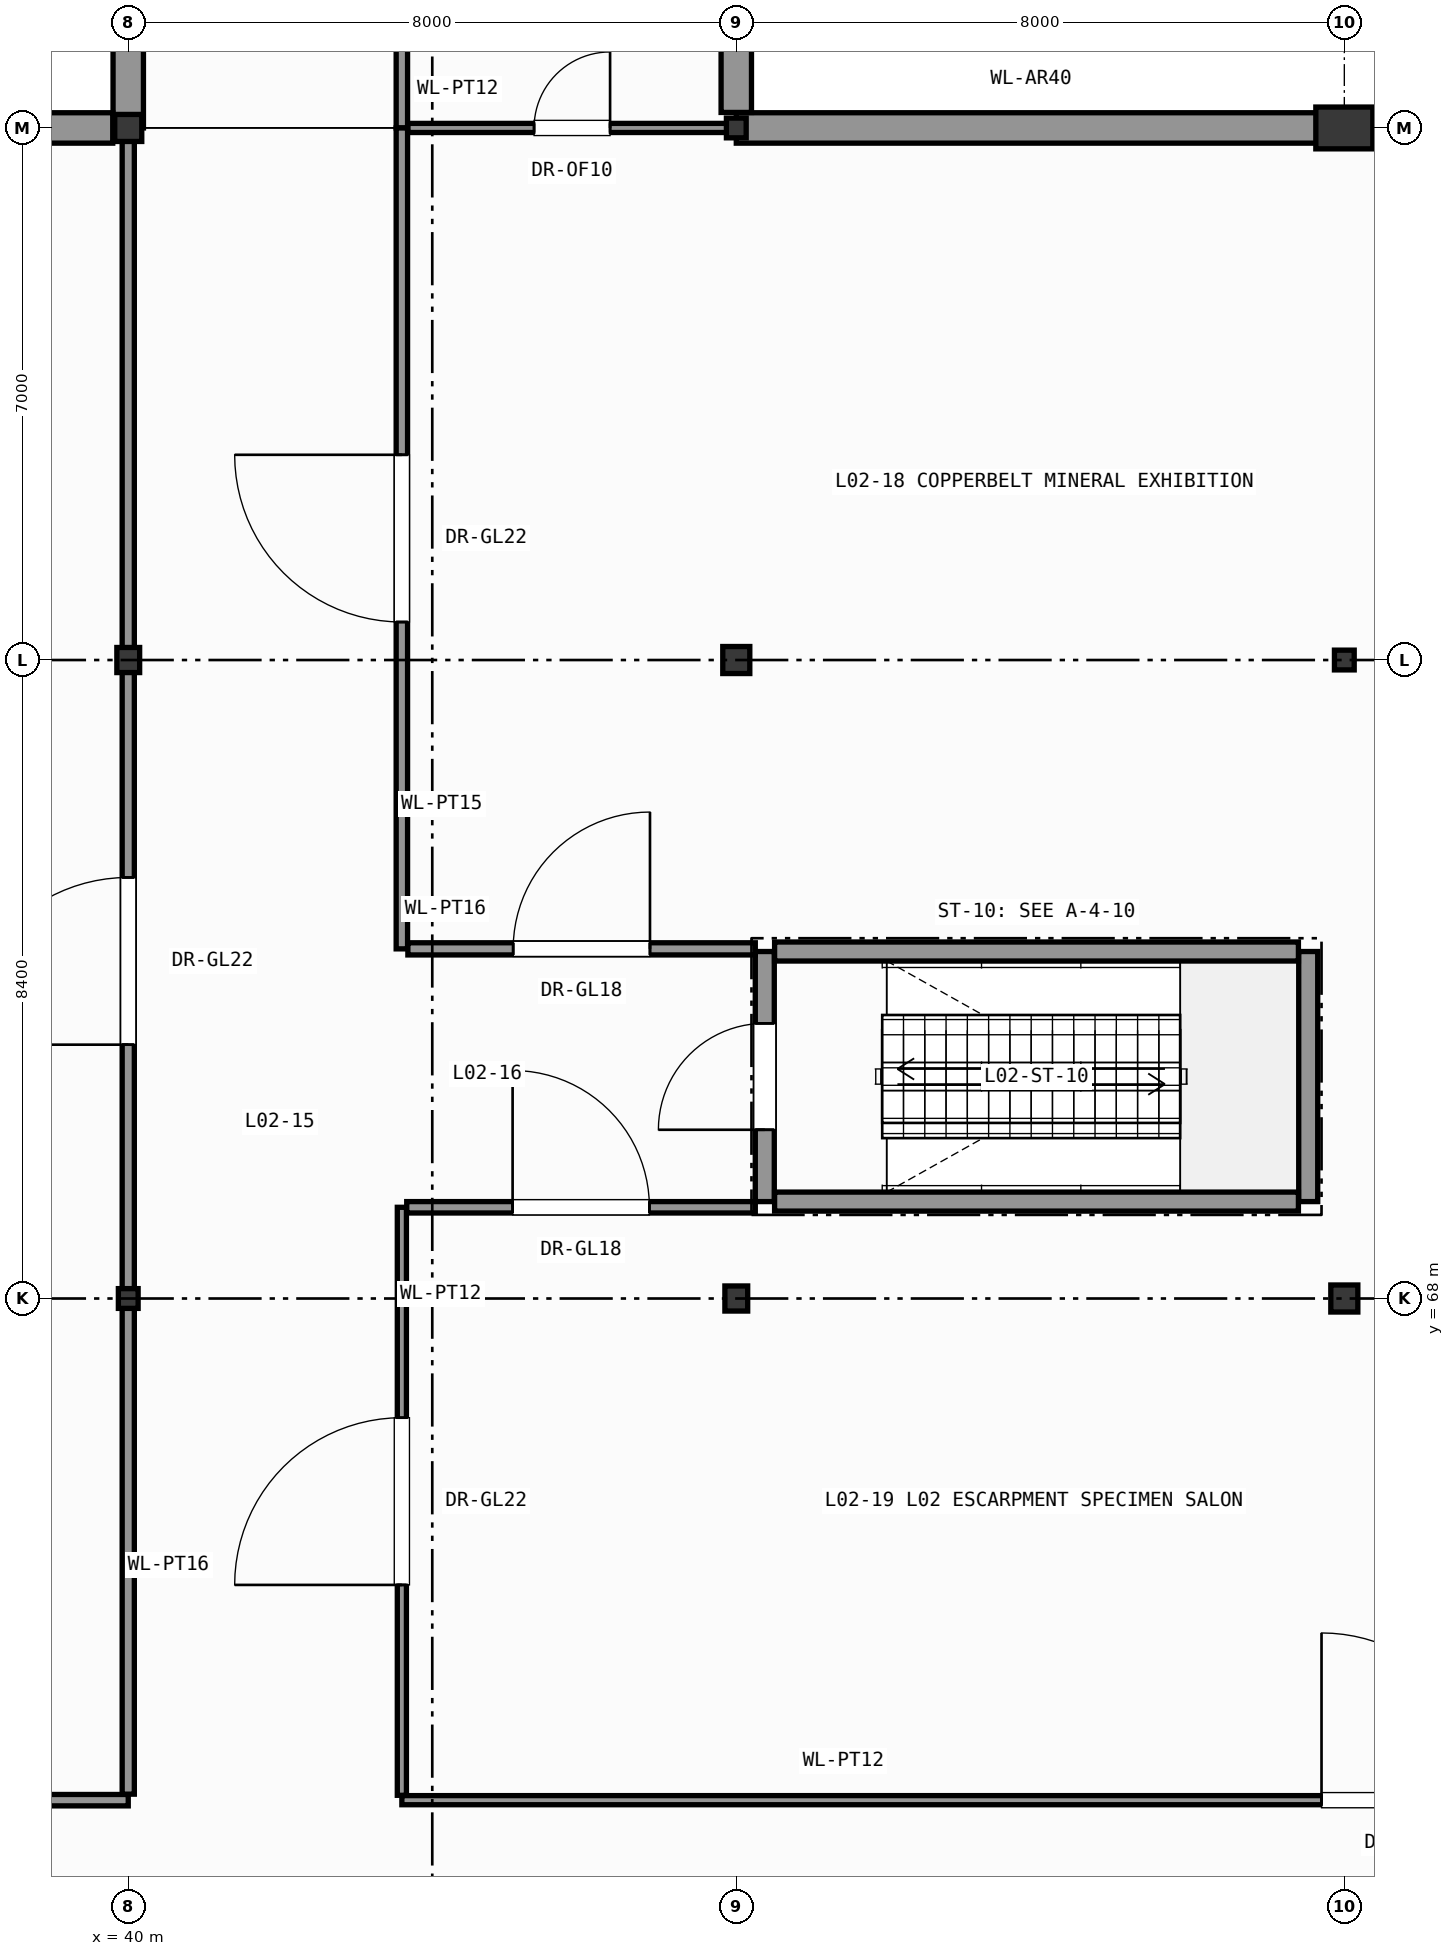
"""IFC4 building model, lengths in metres.
Left out: names, types, materials, properties, quantities, classifications, styles, units other than length and angle.
Written with IfcOpenShell. Run it as: python <this file> out.ifc"""

import sys

from ifc_helpers import new_model, si_unit, direction, frame, frame_2d, origin, origin_2d, place, context, subcontext, project, spatial, rectangle, hollow_rectangle, hollow_circle, i_section, extrude, element, fill, save


model = new_model("IFC4")
c1 = context("Model", 3, precision=1e-05, world=origin(), true_north=direction((0.0, 1.0)))
c2 = subcontext(c1, "Body", "Model", "MODEL_VIEW")
j1 = project(units=[si_unit("LENGTHUNIT", "METRE"), si_unit("PLANEANGLEUNIT", "RADIAN")], contexts=[c1])
p1 = place(None, origin())
s1 = spatial("IfcSite", under=j1, at=p1, CompositionType="ELEMENT")
p2 = place(p1, origin())
s2 = spatial("IfcBuilding", under=s1, at=p2, CompositionType="ELEMENT")
p3 = place(p2, frame((0.0, 0.0, 7.8)))
s3 = spatial("IfcBuildingStorey", under=s2, at=p3, CompositionType="ELEMENT", Elevation=7.8)
p4 = place(p3, frame((40.0, 68.0, 0.0), z_axis=(0.0, 0.0, 1.0), x_axis=(1.0, 0.0, 0.0)))
e1 = element("IfcColumn", 1, at=p4, inside=s3, PredefinedType="COLUMN", context=c2, shape_type="SweptSolid", body=[
    extrude(hollow_rectangle(XDim=0.26, YDim=0.26, WallThickness=0.012, InnerFilletRadius=0.012, OuterFilletRadius=0.025, at=origin_2d()), origin(), (0.0, 0.0, 1.0), 5.4),
])
p5 = place(p3, frame((40.0, 76.4, 0.0), z_axis=(0.0, 0.0, 1.0), x_axis=(1.0, 0.0, 0.0)))
e2 = element("IfcColumn", 2, at=p5, inside=s3, PredefinedType="COLUMN", context=c2, shape_type="SweptSolid", body=[
    extrude(i_section(OverallWidth=0.3, OverallDepth=0.33, WebThickness=0.01, FlangeThickness=0.017, FilletRadius=0.027, at=origin_2d()), origin(), (0.0, 0.0, 1.0), 5.4),
])
p6 = place(p3, frame((40.0, 83.4, 0.0), z_axis=(0.0, 0.0, 1.0), x_axis=(1.0, 0.0, 0.0)))
e3 = element("IfcColumn", 3, at=p6, inside=s3, PredefinedType="COLUMN", context=c2, shape_type="SweptSolid", body=[
    extrude(hollow_circle(Radius=0.178, WallThickness=0.016, at=origin_2d()), origin(), (0.0, 0.0, 1.0), 5.4),
])
p7 = place(p3, frame((48.0, 68.0, 0.0), z_axis=(0.0, 0.0, 1.0), x_axis=(1.0, 0.0, 0.0)))
e4 = element("IfcColumn", 4, at=p7, inside=s3, PredefinedType="COLUMN", context=c2, shape_type="SweptSolid", body=[
    extrude(i_section(OverallWidth=0.3, OverallDepth=0.33, WebThickness=0.01, FlangeThickness=0.017, FilletRadius=0.027, at=origin_2d()), origin(), (0.0, 0.0, 1.0), 5.4),
])
p8 = place(p3, frame((48.0, 76.4, 0.0), z_axis=(0.0, 0.0, 1.0), x_axis=(1.0, 0.0, 0.0)))
e5 = element("IfcColumn", 5, at=p8, inside=s3, PredefinedType="COLUMN", context=c2, shape_type="SweptSolid", body=[
    extrude(hollow_circle(Radius=0.178, WallThickness=0.016, at=origin_2d()), origin(), (0.0, 0.0, 1.0), 5.4),
])
p9 = place(p3, frame((48.0, 83.4, 0.0), z_axis=(0.0, 0.0, 1.0), x_axis=(1.0, 0.0, 0.0)))
e6 = element("IfcColumn", 6, at=p9, inside=s3, PredefinedType="COLUMN", context=c2, shape_type="SweptSolid", body=[
    extrude(hollow_rectangle(XDim=0.26, YDim=0.26, WallThickness=0.012, InnerFilletRadius=0.012, OuterFilletRadius=0.025, at=origin_2d()), origin(), (0.0, 0.0, 1.0), 5.4),
])
p10 = place(p3, frame((56.0, 68.0, 0.0), z_axis=(0.0, 0.0, 1.0), x_axis=(1.0, 0.0, 0.0)))
e7 = element("IfcColumn", 7, at=p10, inside=s3, PredefinedType="COLUMN", context=c2, shape_type="SweptSolid", body=[
    extrude(hollow_circle(Radius=0.178, WallThickness=0.016, at=origin_2d()), origin(), (0.0, 0.0, 1.0), 5.4),
])
p11 = place(p3, frame((56.0, 76.4, 0.0), z_axis=(0.0, 0.0, 1.0), x_axis=(1.0, 0.0, 0.0)))
e8 = element("IfcColumn", 8, at=p11, inside=s3, PredefinedType="COLUMN", context=c2, shape_type="SweptSolid", body=[
    extrude(hollow_rectangle(XDim=0.26, YDim=0.26, WallThickness=0.012, InnerFilletRadius=0.012, OuterFilletRadius=0.025, at=origin_2d()), origin(), (0.0, 0.0, 1.0), 5.4),
])
p12 = place(p3, frame((56.0, 83.4, 0.0), z_axis=(0.0, 0.0, 1.0), x_axis=(1.0, 0.0, 0.0)))
e9 = element("IfcColumn", 9, at=p12, inside=s3, PredefinedType="PILASTER", context=c2, shape_type="SweptSolid", body=[
    extrude(rectangle(XDim=0.75, YDim=0.55, at=origin_2d()), origin(), (0.0, 0.0, 1.0), 5.4),
])
p13 = place(p3, frame((56.0, 83.4, 0.0), z_axis=(0.0, 0.0, 1.0), x_axis=(1.0, 0.0, 0.0)))
e10 = element("IfcWall", 10, at=p13, inside=s3, PredefinedType="SOLIDWALL", context=c2, shape_type="SweptSolid", body=[
    extrude(rectangle(XDim=13.821, YDim=0.4, at=frame_2d((6.911, 0.0))), origin(), (0.0, 0.0, 1.0), 5.15),
])
p14 = place(p3, frame((48.0, 83.4, 0.0), z_axis=(0.0, 0.0, 1.0), x_axis=(1.0, 0.0, 0.0)))
e11 = element("IfcWall", 11, at=p14, inside=s3, PredefinedType="SOLIDWALL", context=c2, shape_type="SweptSolid", body=[
    extrude(rectangle(XDim=8.0, YDim=0.4, at=frame_2d((4.0, 0.0))), origin(), (0.0, 0.0, 1.0), 5.15),
])
p15 = place(p3, frame((48.0, 90.4, 0.0), z_axis=(0.0, 0.0, 1.0), x_axis=(0.0, -1.0, 0.0)))
e12 = element("IfcWall", 12, at=p15, inside=s3, PredefinedType="SOLIDWALL", context=c2, shape_type="SweptSolid", body=[
    extrude(rectangle(XDim=6.796, YDim=0.4, at=frame_2d((3.398, 0.0))), origin(), (0.0, 0.0, 1.0), 5.15),
])
p16 = place(p3, frame((40.0, 83.4, 0.0), z_axis=(0.0, 0.0, 1.0), x_axis=(0.0, 1.0, 0.0)))
e13 = element("IfcWall", 13, at=p16, inside=s3, PredefinedType="SOLIDWALL", context=c2, shape_type="SweptSolid", body=[
    extrude(rectangle(XDim=7.0, YDim=0.4, at=frame_2d((3.5, 0.0))), origin(), (0.0, 0.0, 1.0), 5.15),
])
p17 = place(p3, frame((32.0, 83.4, 0.0), z_axis=(0.0, 0.0, 1.0), x_axis=(1.0, 0.0, 0.0)))
e14 = element("IfcWall", 14, at=p17, inside=s3, PredefinedType="SOLIDWALL", context=c2, shape_type="SweptSolid", body=[
    extrude(rectangle(XDim=7.796, YDim=0.4, at=frame_2d((3.898, 0.0))), origin(), (0.0, 0.0, 1.0), 5.15),
])
p18 = place(p3, frame((48.375, 69.275, 0.0), z_axis=(0.0, 0.0, 1.0), x_axis=(0.0, 1.0, 0.0)))
e15 = element("IfcWall", 15, at=p18, inside=s3, PredefinedType="SHEAR", context=c2, shape_type="SweptSolid", body=[
    extrude(rectangle(XDim=3.29, YDim=0.25, at=frame_2d((1.645, 0.0))), origin(), (0.0, 0.0, 1.0), 5.15),
])
p19 = place(p18, frame((0.945, 0.0, 0.0)))
e16 = element("IfcOpeningElement", 16, at=p19, cuts=e15, PredefinedType="OPENING", context=c2, shape_type="SweptSolid", body=[
    extrude(rectangle(XDim=1.4, YDim=2.2, at=frame_2d((0.7, 1.1))), frame((0.0, 0.135, 0.0), z_axis=(0.0, -1.0, 0.0), x_axis=(1.0, 0.0, 0.0)), (0.0, 0.0, 1.0), 0.27),
])
p20 = place(p3, frame((55.525, 69.275, 0.0), z_axis=(0.0, 0.0, 1.0), x_axis=(0.0, 1.0, 0.0)))
e17 = element("IfcWall", 17, at=p20, inside=s3, PredefinedType="SHEAR", context=c2, shape_type="SweptSolid", body=[
    extrude(rectangle(XDim=3.29, YDim=0.25, at=frame_2d((1.645, 0.0))), origin(), (0.0, 0.0, 1.0), 5.15),
])
for number, where, z_axis, x_axis in (
    (18, (48.504, 69.275, 0.0), (0.0, 0.0, 1.0), (1.0, 0.0, 0.0)),
    (19, (48.504, 72.565, 0.0), (0.0, 0.0, 1.0), (1.0, 0.0, 0.0)),
):
    element("IfcWall", number, at=place(p3, frame(where, z_axis=z_axis, x_axis=x_axis)), inside=s3, PredefinedType="SHEAR", context=c2, shape_type="SweptSolid", body=[
        extrude(rectangle(XDim=6.892, YDim=0.25, at=frame_2d((3.446, 0.0))), origin(), (0.0, 0.0, 1.0), 5.15),
    ])
p21 = place(p3, frame((43.6, 83.4, 0.0), z_axis=(0.0, 0.0, 1.0), x_axis=(0.0, 1.0, 0.0)))
e20 = element("IfcWall", 20, at=p21, inside=s3, PredefinedType="PARTITIONING", context=c2, shape_type="SweptSolid", body=[
    extrude(rectangle(XDim=29.716, YDim=0.15, at=frame_2d((14.858, 0.0))), origin(), (0.0, 0.0, 1.0), 5.15),
])
p22 = place(p21, frame((14.383, 0.0, 0.0)))
e21 = element("IfcOpeningElement", 21, at=p22, cuts=e20, PredefinedType="OPENING", context=c2, shape_type="SweptSolid", body=[
    extrude(rectangle(XDim=0.95, YDim=2.1, at=frame_2d((0.475, 1.05))), frame((0.0, 0.085, 0.0), z_axis=(0.0, -1.0, 0.0), x_axis=(1.0, 0.0, 0.0)), (0.0, 0.0, 1.0), 0.17),
])
p23 = place(p3, frame((43.679, 83.4, 0.0), z_axis=(0.0, 0.0, 1.0), x_axis=(1.0, 0.0, 0.0)))
e22 = element("IfcWall", 22, at=p23, inside=s3, PredefinedType="PARTITIONING", context=c2, shape_type="SweptSolid", body=[
    extrude(rectangle(XDim=4.321, YDim=0.12, at=frame_2d((2.161, 0.0))), origin(), (0.0, 0.0, 1.0), 4.775),
])
p24 = place(p23, frame((1.66, 0.0, 0.0)))
e23 = element("IfcOpeningElement", 23, at=p24, cuts=e22, PredefinedType="OPENING", context=c2, shape_type="SweptSolid", body=[
    extrude(rectangle(XDim=1.0, YDim=2.15, at=frame_2d((0.5, 1.075))), frame((0.0, 0.07, 0.0), z_axis=(0.0, -1.0, 0.0), x_axis=(1.0, 0.0, 0.0)), (0.0, 0.0, 1.0), 0.14),
])
p25 = place(p3, frame((5.004, 61.4, 0.0), z_axis=(0.0, 0.0, 1.0), x_axis=(1.0, 0.0, 0.0)))
e24 = element("IfcWall", 24, at=p25, inside=s3, PredefinedType="PARTITIONING", context=c2, shape_type="SweptSolid", body=[
    extrude(rectangle(XDim=34.996, YDim=0.15, at=frame_2d((17.498, 0.0))), origin(), (0.0, 0.0, 1.0), 5.15),
])
p26 = place(p25, frame((16.398, 0.0, 0.0)))
e25 = element("IfcOpeningElement", 25, at=p26, cuts=e24, PredefinedType="OPENING", context=c2, shape_type="SweptSolid", body=[
    extrude(rectangle(XDim=2.2, YDim=2.6, at=frame_2d((1.1, 1.3))), frame((0.0, 0.085, 0.0), z_axis=(0.0, -1.0, 0.0), x_axis=(1.0, 0.0, 0.0)), (0.0, 0.0, 1.0), 0.17),
])
p27 = place(p3, frame((43.6, 61.4, 0.0), z_axis=(0.0, 0.0, 1.0), x_axis=(1.0, 0.0, 0.0)))
e26 = element("IfcWall", 26, at=p27, inside=s3, PredefinedType="PARTITIONING", context=c2, shape_type="SweptSolid", body=[
    extrude(rectangle(XDim=26.4, YDim=0.12, at=frame_2d((13.2, 0.0))), origin(), (0.0, 0.0, 1.0), 5.15),
])
p28 = place(p27, frame((12.1, 0.0, 0.0)))
e27 = element("IfcOpeningElement", 27, at=p28, cuts=e26, PredefinedType="OPENING", context=c2, shape_type="SweptSolid", body=[
    extrude(rectangle(XDim=2.2, YDim=2.6, at=frame_2d((1.1, 1.3))), frame((0.0, 0.07, 0.0), z_axis=(0.0, -1.0, 0.0), x_axis=(1.0, 0.0, 0.0)), (0.0, 0.0, 1.0), 0.14),
])
p29 = place(p3, frame((40.0, 61.479, 0.0), z_axis=(0.0, 0.0, 1.0), x_axis=(0.0, 1.0, 0.0)))
e28 = element("IfcWall", 28, at=p29, inside=s3, PredefinedType="PARTITIONING", context=c2, shape_type="SweptSolid", body=[
    extrude(rectangle(XDim=21.921, YDim=0.16, at=frame_2d((10.96, 0.0))), origin(), (0.0, 0.0, 1.0), 4.635),
])
p30 = place(p29, frame((9.861, 0.0, 0.0)))
e29 = element("IfcOpeningElement", 29, at=p30, cuts=e28, PredefinedType="OPENING", context=c2, shape_type="SweptSolid", body=[
    extrude(rectangle(XDim=2.2, YDim=2.6, at=frame_2d((1.1, 1.3))), frame((0.0, 0.09, 0.0), z_axis=(0.0, -1.0, 0.0), x_axis=(1.0, 0.0, 0.0)), (0.0, 0.0, 1.0), 0.18),
])
p31 = place(p3, frame((43.6, 72.6, 0.0), z_axis=(0.0, 0.0, 1.0), x_axis=(0.0, 1.0, 0.0)))
e30 = element("IfcWall", 30, at=p31, inside=s3, PredefinedType="PARTITIONING", context=c2, shape_type="SweptSolid", body=[
    extrude(rectangle(XDim=10.8, YDim=0.15, at=frame_2d((5.4, 0.0))), origin(), (0.0, 0.0, 1.0), 5.15),
])
p32 = place(p31, frame((4.3, 0.0, 0.0)))
e31 = element("IfcOpeningElement", 31, at=p32, cuts=e30, PredefinedType="OPENING", context=c2, shape_type="SweptSolid", body=[
    extrude(rectangle(XDim=2.2, YDim=2.6, at=frame_2d((1.1, 1.3))), frame((0.0, 0.085, 0.0), z_axis=(0.0, -1.0, 0.0), x_axis=(1.0, 0.0, 0.0)), (0.0, 0.0, 1.0), 0.17),
])
p33 = place(p3, frame((43.6, 61.464, 0.0), z_axis=(0.0, 0.0, 1.0), x_axis=(0.0, 1.0, 0.0)))
e32 = element("IfcWall", 32, at=p33, inside=s3, PredefinedType="PARTITIONING", context=c2, shape_type="SweptSolid", body=[
    extrude(rectangle(XDim=7.736, YDim=0.12, at=frame_2d((3.868, 0.0))), origin(), (0.0, 0.0, 1.0), 5.15),
])
p34 = place(p33, frame((2.768, 0.0, 0.0)))
e33 = element("IfcOpeningElement", 33, at=p34, cuts=e32, PredefinedType="OPENING", context=c2, shape_type="SweptSolid", body=[
    extrude(rectangle(XDim=2.2, YDim=2.6, at=frame_2d((1.1, 1.3))), frame((0.0, 0.07, 0.0), z_axis=(0.0, -1.0, 0.0), x_axis=(1.0, 0.0, 0.0)), (0.0, 0.0, 1.0), 0.14),
])
p35 = place(p3, frame((43.679, 72.6, 0.0), z_axis=(0.0, 0.0, 1.0), x_axis=(1.0, 0.0, 0.0)))
e34 = element("IfcWall", 34, at=p35, inside=s3, PredefinedType="PARTITIONING", context=c2, shape_type="SweptSolid", body=[
    extrude(rectangle(XDim=4.571, YDim=0.16, at=frame_2d((2.286, 0.0))), origin(), (0.0, 0.0, 1.0), 5.15),
])
p36 = place(p35, frame((1.385, 0.0, 0.0)))
e35 = element("IfcOpeningElement", 35, at=p36, cuts=e34, PredefinedType="OPENING", context=c2, shape_type="SweptSolid", body=[
    extrude(rectangle(XDim=1.8, YDim=2.4, at=frame_2d((0.9, 1.2))), frame((0.0, 0.09, 0.0), z_axis=(0.0, -1.0, 0.0), x_axis=(1.0, 0.0, 0.0)), (0.0, 0.0, 1.0), 0.18),
])
p37 = place(p3, frame((43.664, 69.2, 0.0), z_axis=(0.0, 0.0, 1.0), x_axis=(1.0, 0.0, 0.0)))
e36 = element("IfcWall", 36, at=p37, inside=s3, PredefinedType="PARTITIONING", context=c2, shape_type="SweptSolid", body=[
    extrude(rectangle(XDim=4.586, YDim=0.15, at=frame_2d((2.293, 0.0))), origin(), (0.0, 0.0, 1.0), 5.15),
])
p38 = place(p37, frame((1.393, 0.0, 0.0)))
e37 = element("IfcOpeningElement", 37, at=p38, cuts=e36, PredefinedType="OPENING", context=c2, shape_type="SweptSolid", body=[
    extrude(rectangle(XDim=1.8, YDim=2.4, at=frame_2d((0.9, 1.2))), frame((0.0, 0.085, 0.0), z_axis=(0.0, -1.0, 0.0), x_axis=(1.0, 0.0, 0.0)), (0.0, 0.0, 1.0), 0.17),
])
p39 = place(p19, origin())
e38 = element("IfcDoor", 38, at=p39, inside=s3, OperationType="SINGLE_SWING_LEFT", PredefinedType="DOOR", context=c2, shape_type="SweptSolid", body=[
    extrude(rectangle(XDim=1.4, YDim=2.2, at=frame_2d((0.7, 1.1))), frame((0.0, 0.025, 0.0), z_axis=(0.0, -1.0, 0.0), x_axis=(1.0, 0.0, 0.0)), (0.0, 0.0, 1.0), 0.05),
])
fill(e16, e38)
p40 = place(p24, origin())
e39 = element("IfcDoor", 39, at=p40, inside=s3, OperationType="SINGLE_SWING_RIGHT", PredefinedType="DOOR", context=c2, shape_type="SweptSolid", body=[
    extrude(rectangle(XDim=1.0, YDim=2.15, at=frame_2d((0.5, 1.075))), frame((0.0, 0.025, 0.0), z_axis=(0.0, -1.0, 0.0), x_axis=(1.0, 0.0, 0.0)), (0.0, 0.0, 1.0), 0.05),
])
fill(e23, e39)
p41 = place(p28, origin())
e40 = element("IfcDoor", 40, at=p41, inside=s3, OperationType="SINGLE_SWING_LEFT", PredefinedType="DOOR", context=c2, shape_type="SweptSolid", body=[
    extrude(rectangle(XDim=2.2, YDim=2.6, at=frame_2d((1.1, 1.3))), frame((0.0, 0.025, 0.0), z_axis=(0.0, -1.0, 0.0), x_axis=(1.0, 0.0, 0.0)), (0.0, 0.0, 1.0), 0.05),
])
fill(e27, e40)
p42 = place(p30, origin())
e41 = element("IfcDoor", 41, at=p42, inside=s3, OperationType="SINGLE_SWING_LEFT", PredefinedType="DOOR", context=c2, shape_type="SweptSolid", body=[
    extrude(rectangle(XDim=2.2, YDim=2.6, at=frame_2d((1.1, 1.3))), frame((0.0, 0.025, 0.0), z_axis=(0.0, -1.0, 0.0), x_axis=(1.0, 0.0, 0.0)), (0.0, 0.0, 1.0), 0.05),
])
fill(e29, e41)
p43 = place(p32, origin())
e42 = element("IfcDoor", 42, at=p43, inside=s3, OperationType="SINGLE_SWING_RIGHT", PredefinedType="DOOR", context=c2, shape_type="SweptSolid", body=[
    extrude(rectangle(XDim=2.2, YDim=2.6, at=frame_2d((1.1, 1.3))), frame((0.0, 0.025, 0.0), z_axis=(0.0, -1.0, 0.0), x_axis=(1.0, 0.0, 0.0)), (0.0, 0.0, 1.0), 0.05),
])
fill(e31, e42)
p44 = place(p34, origin())
e43 = element("IfcDoor", 43, at=p44, inside=s3, OperationType="SINGLE_SWING_LEFT", PredefinedType="DOOR", context=c2, shape_type="SweptSolid", body=[
    extrude(rectangle(XDim=2.2, YDim=2.6, at=frame_2d((1.1, 1.3))), frame((0.0, 0.025, 0.0), z_axis=(0.0, -1.0, 0.0), x_axis=(1.0, 0.0, 0.0)), (0.0, 0.0, 1.0), 0.05),
])
fill(e33, e43)
p45 = place(p36, origin())
e44 = element("IfcDoor", 44, at=p45, inside=s3, OperationType="SINGLE_SWING_RIGHT", PredefinedType="DOOR", context=c2, shape_type="SweptSolid", body=[
    extrude(rectangle(XDim=1.8, YDim=2.4, at=frame_2d((0.9, 1.2))), frame((0.0, 0.025, 0.0), z_axis=(0.0, -1.0, 0.0), x_axis=(1.0, 0.0, 0.0)), (0.0, 0.0, 1.0), 0.05),
])
fill(e35, e44)
p46 = place(p38, origin())
e45 = element("IfcDoor", 45, at=p46, inside=s3, OperationType="SINGLE_SWING_LEFT", PredefinedType="DOOR", context=c2, shape_type="SweptSolid", body=[
    extrude(rectangle(XDim=1.8, YDim=2.4, at=frame_2d((0.9, 1.2))), frame((0.0, 0.025, 0.0), z_axis=(0.0, -1.0, 0.0), x_axis=(1.0, 0.0, 0.0)), (0.0, 0.0, 1.0), 0.05),
])
fill(e37, e45)
save(model, sys.argv[1])
